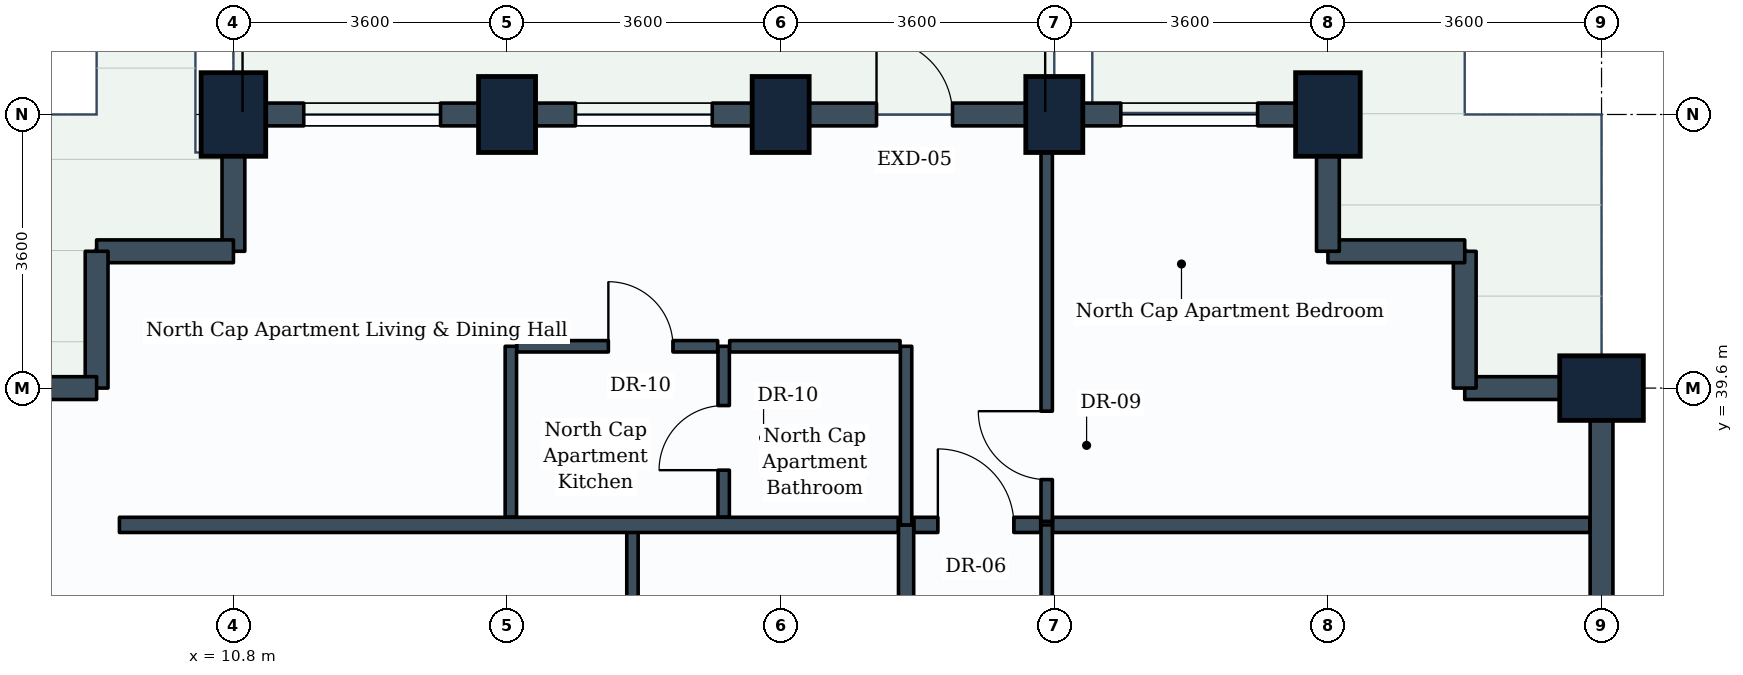
"""IFC4 building model, lengths in metres.
Left out: names, types, materials, properties, quantities, classifications, styles, units other than length and angle.
Written with IfcOpenShell. Run it as: python <this file> out.ifc"""

import sys

from ifc_helpers import new_model, si_unit, direction, frame, frame_2d, origin, origin_2d, place, context, subcontext, project, spatial, rectangle, extrude, element, fill, save


model = new_model("IFC4")
c1 = context("Model", 3, precision=1e-05, world=origin(), true_north=direction((0.0, 1.0)))
c2 = subcontext(c1, "Body", "Model", "MODEL_VIEW")
j1 = project(units=[si_unit("LENGTHUNIT", "METRE"), si_unit("PLANEANGLEUNIT", "RADIAN")], contexts=[c1])
p1 = place(None, origin())
s1 = spatial("IfcSite", under=j1, at=p1, CompositionType="ELEMENT")
p2 = place(p1, origin())
s2 = spatial("IfcBuilding", under=s1, at=p2, CompositionType="ELEMENT")
p3 = place(p2, frame((0.0, 0.0, 127.6)))
s3 = spatial("IfcBuildingStorey", under=s2, at=p3, CompositionType="ELEMENT", Elevation=127.6)
p4 = place(p3, frame((10.8, 43.2, 0.0), z_axis=(0.0, 0.0, 1.0), x_axis=(1.0, 0.0, 0.0)))
e1 = element("IfcColumn", 1, at=p4, inside=s3, PredefinedType="COLUMN", context=c2, shape_type="SweptSolid", body=[
    extrude(rectangle(XDim=0.85, YDim=1.1, at=origin_2d()), origin(), (0.0, 0.0, 1.0), 3.8),
])
for number, where, z_axis, x_axis in (
    (2, (14.4, 43.2, 0.0), (0.0, 0.0, 1.0), (1.0, 0.0, 0.0)),
    (3, (18.0, 43.2, 0.0), (0.0, 0.0, 1.0), (1.0, 0.0, 0.0)),
    (4, (21.6, 43.2, 0.0), (0.0, 0.0, 1.0), (1.0, 0.0, 0.0)),
):
    element("IfcColumn", number, at=place(p3, frame(where, z_axis=z_axis, x_axis=x_axis)), inside=s3, PredefinedType="COLUMN", context=c2, shape_type="SweptSolid", body=[
        extrude(rectangle(XDim=0.75, YDim=1.0, at=origin_2d()), origin(), (0.0, 0.0, 1.0), 3.8),
    ])
for number, where, z_axis, x_axis in (
    (5, (25.2, 43.2, 0.0), (0.0, 0.0, 1.0), (1.0, 0.0, 0.0)),
    (6, (28.8, 39.6, 0.0), (0.0, 0.0, 1.0), (0.0, 1.0, 0.0)),
):
    element("IfcColumn", number, at=place(p3, frame(where, z_axis=z_axis, x_axis=x_axis)), inside=s3, PredefinedType="COLUMN", context=c2, shape_type="SweptSolid", body=[
        extrude(rectangle(XDim=0.85, YDim=1.1, at=origin_2d()), origin(), (0.0, 0.0, 1.0), 3.8),
    ])
p5 = place(p3, frame((28.8, 39.6, 0.0), z_axis=(0.0, 0.0, 1.0), x_axis=(0.0, -1.0, 0.0)))
e7 = element("IfcWall", 7, at=p5, inside=s3, PredefinedType="STANDARD", context=c2, shape_type="SweptSolid", body=[
    extrude(rectangle(XDim=3.6, YDim=0.3, at=frame_2d((1.8, 0.0))), origin(), (0.0, 0.0, 1.0), 2.93),
])
p6 = place(p3, frame((27.0, 39.6, 0.0), z_axis=(0.0, 0.0, 1.0), x_axis=(1.0, 0.0, 0.0)))
e8 = element("IfcWall", 8, at=p6, inside=s3, PredefinedType="STANDARD", context=c2, shape_type="SweptSolid", body=[
    extrude(rectangle(XDim=1.8, YDim=0.3, at=frame_2d((0.9, 0.0))), origin(), (0.0, 0.0, 1.0), 2.93),
])
p7 = place(p3, frame((27.0, 39.6, 0.0), z_axis=(0.0, 0.0, 1.0), x_axis=(0.0, 1.0, 0.0)))
e9 = element("IfcWall", 9, at=p7, inside=s3, PredefinedType="STANDARD", context=c2, shape_type="SweptSolid", body=[
    extrude(rectangle(XDim=1.8, YDim=0.3, at=frame_2d((0.9, 0.0))), origin(), (0.0, 0.0, 1.0), 3.535),
])
p8 = place(p3, frame((25.2, 41.4, 0.0), z_axis=(0.0, 0.0, 1.0), x_axis=(1.0, 0.0, 0.0)))
e10 = element("IfcWall", 10, at=p8, inside=s3, PredefinedType="STANDARD", context=c2, shape_type="SweptSolid", body=[
    extrude(rectangle(XDim=1.8, YDim=0.3, at=frame_2d((0.9, 0.0))), origin(), (0.0, 0.0, 1.0), 3.535),
])
p9 = place(p3, frame((25.2, 41.4, 0.0), z_axis=(0.0, 0.0, 1.0), x_axis=(0.0, 1.0, 0.0)))
e11 = element("IfcWall", 11, at=p9, inside=s3, PredefinedType="STANDARD", context=c2, shape_type="SweptSolid", body=[
    extrude(rectangle(XDim=1.8, YDim=0.3, at=frame_2d((0.9, 0.0))), origin(), (0.0, 0.0, 1.0), 2.93),
])
p10 = place(p3, frame((21.6, 43.2, 0.0), z_axis=(0.0, 0.0, 1.0), x_axis=(1.0, 0.0, 0.0)))
e12 = element("IfcWall", 12, at=p10, inside=s3, PredefinedType="STANDARD", context=c2, shape_type="SweptSolid", body=[
    extrude(rectangle(XDim=3.6, YDim=0.3, at=frame_2d((1.8, 0.0))), origin(), (0.0, 0.0, 1.0), 2.93),
])
p11 = place(p10, frame((0.875, 0.0, 0.85)))
e13 = element("IfcOpeningElement", 13, at=p11, cuts=e12, PredefinedType="OPENING", context=c2, shape_type="SweptSolid", body=[
    extrude(rectangle(XDim=1.8, YDim=1.35, at=frame_2d((0.9, 0.675))), frame((0.0, 0.16, 0.0), z_axis=(0.0, -1.0, 0.0), x_axis=(1.0, 0.0, 0.0)), (0.0, 0.0, 1.0), 0.32),
])
p12 = place(p3, frame((18.0, 43.2, 0.0), z_axis=(0.0, 0.0, 1.0), x_axis=(1.0, 0.0, 0.0)))
e14 = element("IfcWall", 14, at=p12, inside=s3, PredefinedType="STANDARD", context=c2, shape_type="SweptSolid", body=[
    extrude(rectangle(XDim=3.6, YDim=0.3, at=frame_2d((1.8, 0.0))), origin(), (0.0, 0.0, 1.0), 2.93),
])
p13 = place(p12, frame((1.261, 0.0, 0.0)))
e15 = element("IfcOpeningElement", 15, at=p13, cuts=e14, PredefinedType="OPENING", context=c2, shape_type="SweptSolid", body=[
    extrude(rectangle(XDim=1.0, YDim=2.1, at=frame_2d((0.5, 1.05))), frame((0.0, 0.16, 0.0), z_axis=(0.0, -1.0, 0.0), x_axis=(1.0, 0.0, 0.0)), (0.0, 0.0, 1.0), 0.32),
])
p14 = place(p3, frame((14.4, 43.2, 0.0), z_axis=(0.0, 0.0, 1.0), x_axis=(1.0, 0.0, 0.0)))
e16 = element("IfcWall", 16, at=p14, inside=s3, PredefinedType="STANDARD", context=c2, shape_type="SweptSolid", body=[
    extrude(rectangle(XDim=3.6, YDim=0.3, at=frame_2d((1.8, 0.0))), origin(), (0.0, 0.0, 1.0), 2.93),
])
p15 = place(p14, frame((0.9, 0.0, 0.85)))
e17 = element("IfcOpeningElement", 17, at=p15, cuts=e16, PredefinedType="OPENING", context=c2, shape_type="SweptSolid", body=[
    extrude(rectangle(XDim=1.8, YDim=1.35, at=frame_2d((0.9, 0.675))), frame((0.0, 0.16, 0.0), z_axis=(0.0, -1.0, 0.0), x_axis=(1.0, 0.0, 0.0)), (0.0, 0.0, 1.0), 0.32),
])
p16 = place(p3, frame((10.8, 43.2, 0.0), z_axis=(0.0, 0.0, 1.0), x_axis=(1.0, 0.0, 0.0)))
e18 = element("IfcWall", 18, at=p16, inside=s3, PredefinedType="STANDARD", context=c2, shape_type="SweptSolid", body=[
    extrude(rectangle(XDim=3.6, YDim=0.3, at=frame_2d((1.8, 0.0))), origin(), (0.0, 0.0, 1.0), 2.93),
])
p17 = place(p16, frame((0.925, 0.0, 0.85)))
e19 = element("IfcOpeningElement", 19, at=p17, cuts=e18, PredefinedType="OPENING", context=c2, shape_type="SweptSolid", body=[
    extrude(rectangle(XDim=1.8, YDim=1.35, at=frame_2d((0.9, 0.675))), frame((0.0, 0.16, 0.0), z_axis=(0.0, -1.0, 0.0), x_axis=(1.0, 0.0, 0.0)), (0.0, 0.0, 1.0), 0.32),
])
p18 = place(p3, frame((10.8, 41.4, 0.0), z_axis=(0.0, 0.0, 1.0), x_axis=(0.0, 1.0, 0.0)))
e20 = element("IfcWall", 20, at=p18, inside=s3, PredefinedType="STANDARD", context=c2, shape_type="SweptSolid", body=[
    extrude(rectangle(XDim=1.8, YDim=0.3, at=frame_2d((0.9, 0.0))), origin(), (0.0, 0.0, 1.0), 2.93),
])
p19 = place(p3, frame((9.0, 41.4, 0.0), z_axis=(0.0, 0.0, 1.0), x_axis=(1.0, 0.0, 0.0)))
e21 = element("IfcWall", 21, at=p19, inside=s3, PredefinedType="STANDARD", context=c2, shape_type="SweptSolid", body=[
    extrude(rectangle(XDim=1.8, YDim=0.3, at=frame_2d((0.9, 0.0))), origin(), (0.0, 0.0, 1.0), 3.535),
])
p20 = place(p3, frame((9.0, 39.6, 0.0), z_axis=(0.0, 0.0, 1.0), x_axis=(0.0, 1.0, 0.0)))
e22 = element("IfcWall", 22, at=p20, inside=s3, PredefinedType="STANDARD", context=c2, shape_type="SweptSolid", body=[
    extrude(rectangle(XDim=1.8, YDim=0.3, at=frame_2d((0.9, 0.0))), origin(), (0.0, 0.0, 1.0), 3.535),
])
p21 = place(p3, frame((7.2, 39.6, 0.0), z_axis=(0.0, 0.0, 1.0), x_axis=(1.0, 0.0, 0.0)))
e23 = element("IfcWall", 23, at=p21, inside=s3, PredefinedType="STANDARD", context=c2, shape_type="SweptSolid", body=[
    extrude(rectangle(XDim=1.8, YDim=0.3, at=frame_2d((0.9, 0.0))), origin(), (0.0, 0.0, 1.0), 2.93),
])
p22 = place(p3, frame((19.65, 33.7, 0.0), z_axis=(0.0, 0.0, 1.0), x_axis=(0.0, 1.0, 0.0)))
e24 = element("IfcWall", 24, at=p22, inside=s3, PredefinedType="PARTITIONING", context=c2, shape_type="SweptSolid", body=[
    extrude(rectangle(XDim=4.1, YDim=0.2, at=frame_2d((2.05, 0.0))), origin(), (0.0, 0.0, 1.0), 3.17),
])
p23 = place(p22, frame((1.55, 0.0, 0.0)))
e25 = element("IfcOpeningElement", 25, at=p23, cuts=e24, PredefinedType="OPENING", context=c2, shape_type="SweptSolid", body=[
    extrude(rectangle(XDim=1.0, YDim=2.1, at=frame_2d((0.5, 1.05))), frame((0.0, 0.11, 0.0), z_axis=(0.0, -1.0, 0.0), x_axis=(1.0, 0.0, 0.0)), (0.0, 0.0, 1.0), 0.22),
])
p24 = place(p3, frame((16.05, 33.9, 0.0), z_axis=(0.0, 0.0, 1.0), x_axis=(0.0, 1.0, 0.0)))
e26 = element("IfcWall", 26, at=p24, inside=s3, PredefinedType="PARTITIONING", context=c2, shape_type="SweptSolid", body=[
    extrude(rectangle(XDim=3.9, YDim=0.15, at=frame_2d((1.95, 0.0))), origin(), (0.0, 0.0, 1.0), 3.17),
])
p25 = place(p24, frame((1.461, 0.0, 0.0)))
e27 = element("IfcOpeningElement", 27, at=p25, cuts=e26, PredefinedType="OPENING", context=c2, shape_type="SweptSolid", body=[
    extrude(rectangle(XDim=0.9, YDim=2.1, at=frame_2d((0.45, 1.05))), frame((0.0, 0.085, 0.0), z_axis=(0.0, -1.0, 0.0), x_axis=(1.0, 0.0, 0.0)), (0.0, 0.0, 1.0), 0.17),
])
p26 = place(p3, frame((21.5, 26.879, 0.0), z_axis=(0.0, 0.0, 1.0), x_axis=(0.0, 1.0, 0.0)))
e28 = element("IfcWall", 28, at=p26, inside=s3, PredefinedType="PARTITIONING", context=c2, shape_type="SweptSolid", body=[
    extrude(rectangle(XDim=10.921, YDim=0.15, at=frame_2d((5.46, 0.0))), origin(), (0.0, 0.0, 1.0), 3.13),
])
p27 = place(p26, frame((4.247, 0.0, 0.0)))
e29 = element("IfcOpeningElement", 29, at=p27, cuts=e28, PredefinedType="OPENING", context=c2, shape_type="SweptSolid", body=[
    extrude(rectangle(XDim=1.0, YDim=2.1, at=frame_2d((0.5, 1.05))), frame((0.0, 0.085, 0.0), z_axis=(0.0, -1.0, 0.0), x_axis=(1.0, 0.0, 0.0)), (0.0, 0.0, 1.0), 0.17),
])
p28 = place(p3, frame((9.3, 37.8, 0.0), z_axis=(0.0, 0.0, 1.0), x_axis=(1.0, 0.0, 0.0)))
e30 = element("IfcWall", 30, at=p28, inside=s3, PredefinedType="PARTITIONING", context=c2, shape_type="SweptSolid", body=[
    extrude(rectangle(XDim=10.246, YDim=0.2, at=frame_2d((5.123, 0.0))), origin(), (0.0, 0.0, 1.0), 3.17),
])
p29 = place(p3, frame((21.579, 37.8, 0.0), z_axis=(0.0, 0.0, 1.0), x_axis=(1.0, 0.0, 0.0)))
e31 = element("IfcWall", 31, at=p29, inside=s3, PredefinedType="PARTITIONING", context=c2, shape_type="SweptSolid", body=[
    extrude(rectangle(XDim=7.067, YDim=0.2, at=frame_2d((3.533, 0.0))), origin(), (0.0, 0.0, 1.0), 2.93),
])
p30 = place(p3, frame((19.754, 37.8, 0.0), z_axis=(0.0, 0.0, 1.0), x_axis=(1.0, 0.0, 0.0)))
e32 = element("IfcWall", 32, at=p30, inside=s3, PredefinedType="PARTITIONING", context=c2, shape_type="SweptSolid", body=[
    extrude(rectangle(XDim=1.667, YDim=0.2, at=frame_2d((0.833, 0.0))), origin(), (0.0, 0.0, 1.0), 3.535),
])
p31 = place(p30, frame((0.314, 0.0, 0.0)))
e33 = element("IfcOpeningElement", 33, at=p31, cuts=e32, PredefinedType="OPENING", context=c2, shape_type="SweptSolid", body=[
    extrude(rectangle(XDim=1.0, YDim=2.1, at=frame_2d((0.5, 1.05))), frame((0.0, 0.11, 0.0), z_axis=(0.0, -1.0, 0.0), x_axis=(1.0, 0.0, 0.0)), (0.0, 0.0, 1.0), 0.22),
])
p32 = place(p3, frame((19.65, 37.8, 0.0), z_axis=(0.0, 0.0, 1.0), x_axis=(0.0, 1.0, 0.0)))
e34 = element("IfcWall", 34, at=p32, inside=s3, PredefinedType="PARTITIONING", context=c2, shape_type="SweptSolid", body=[
    extrude(rectangle(XDim=2.35, YDim=0.15, at=frame_2d((1.175, 0.0))), origin(), (0.0, 0.0, 1.0), 3.535),
])
p33 = place(p3, frame((17.25, 37.904, 0.0), z_axis=(0.0, 0.0, 1.0), x_axis=(0.0, 1.0, 0.0)))
e35 = element("IfcWall", 35, at=p33, inside=s3, PredefinedType="PARTITIONING", context=c2, shape_type="SweptSolid", body=[
    extrude(rectangle(XDim=2.246, YDim=0.15, at=frame_2d((1.123, 0.0))), origin(), (0.0, 0.0, 1.0), 3.535),
])
p34 = place(p33, frame((0.616, 0.0, 0.0)))
e36 = element("IfcOpeningElement", 36, at=p34, cuts=e35, PredefinedType="OPENING", context=c2, shape_type="SweptSolid", body=[
    extrude(rectangle(XDim=0.85, YDim=2.1, at=frame_2d((0.425, 1.05))), frame((0.0, 0.085, 0.0), z_axis=(0.0, -1.0, 0.0), x_axis=(1.0, 0.0, 0.0)), (0.0, 0.0, 1.0), 0.17),
])
p35 = place(p3, frame((17.329, 40.15, 0.0), z_axis=(0.0, 0.0, 1.0), x_axis=(1.0, 0.0, 0.0)))
e37 = element("IfcWall", 37, at=p35, inside=s3, PredefinedType="PARTITIONING", context=c2, shape_type="SweptSolid", body=[
    extrude(rectangle(XDim=2.242, YDim=0.15, at=frame_2d((1.121, 0.0))), origin(), (0.0, 0.0, 1.0), 3.17),
])
p36 = place(p3, frame((21.5, 37.846, 0.0), z_axis=(0.0, 0.0, 1.0), x_axis=(0.0, 1.0, 0.0)))
e38 = element("IfcWall", 38, at=p36, inside=s3, PredefinedType="PARTITIONING", context=c2, shape_type="SweptSolid", body=[
    extrude(rectangle(XDim=5.2, YDim=0.15, at=frame_2d((2.6, 0.0))), origin(), (0.0, 0.0, 1.0), 2.93),
])
p37 = place(p36, frame((0.55, 0.0, 0.0)))
e39 = element("IfcOpeningElement", 39, at=p37, cuts=e38, PredefinedType="OPENING", context=c2, shape_type="SweptSolid", body=[
    extrude(rectangle(XDim=0.9, YDim=2.1, at=frame_2d((0.45, 1.05))), frame((0.0, 0.085, 0.0), z_axis=(0.0, -1.0, 0.0), x_axis=(1.0, 0.0, 0.0)), (0.0, 0.0, 1.0), 0.17),
])
p38 = place(p3, frame((14.45, 37.904, 0.0), z_axis=(0.0, 0.0, 1.0), x_axis=(0.0, 1.0, 0.0)))
e40 = element("IfcWall", 40, at=p38, inside=s3, PredefinedType="PARTITIONING", context=c2, shape_type="SweptSolid", body=[
    extrude(rectangle(XDim=2.246, YDim=0.15, at=frame_2d((1.123, 0.0))), origin(), (0.0, 0.0, 1.0), 3.535),
])
p39 = place(p3, frame((14.529, 40.15, 0.0), z_axis=(0.0, 0.0, 1.0), x_axis=(1.0, 0.0, 0.0)))
e41 = element("IfcWall", 41, at=p39, inside=s3, PredefinedType="PARTITIONING", context=c2, shape_type="SweptSolid", body=[
    extrude(rectangle(XDim=2.642, YDim=0.15, at=frame_2d((1.321, 0.0))), origin(), (0.0, 0.0, 1.0), 3.535),
])
p40 = place(p39, frame((1.204, 0.0, 0.0)))
e42 = element("IfcOpeningElement", 42, at=p40, cuts=e41, PredefinedType="OPENING", context=c2, shape_type="SweptSolid", body=[
    extrude(rectangle(XDim=0.85, YDim=2.1, at=frame_2d((0.425, 1.05))), frame((0.0, 0.085, 0.0), z_axis=(0.0, -1.0, 0.0), x_axis=(1.0, 0.0, 0.0)), (0.0, 0.0, 1.0), 0.17),
])
p41 = place(p11, origin())
e43 = element("IfcWindow", 43, at=p41, inside=s3, PartitioningType="SINGLE_PANEL", PredefinedType="WINDOW", context=c2, shape_type="SweptSolid", body=[
    extrude(rectangle(XDim=1.8, YDim=1.35, at=frame_2d((0.9, 0.675))), frame((0.0, 0.03, 0.0), z_axis=(0.0, -1.0, 0.0), x_axis=(1.0, 0.0, 0.0)), (0.0, 0.0, 1.0), 0.06),
])
fill(e13, e43)
p42 = place(p13, origin())
e44 = element("IfcDoor", 44, at=p42, inside=s3, OperationType="SINGLE_SWING_LEFT", PredefinedType="DOOR", context=c2, shape_type="SweptSolid", body=[
    extrude(rectangle(XDim=1.0, YDim=2.1, at=frame_2d((0.5, 1.05))), frame((0.0, 0.025, 0.0), z_axis=(0.0, -1.0, 0.0), x_axis=(1.0, 0.0, 0.0)), (0.0, 0.0, 1.0), 0.05),
])
fill(e15, e44)
p43 = place(p15, origin())
e45 = element("IfcWindow", 45, at=p43, inside=s3, PartitioningType="SINGLE_PANEL", PredefinedType="WINDOW", context=c2, shape_type="SweptSolid", body=[
    extrude(rectangle(XDim=1.8, YDim=1.35, at=frame_2d((0.9, 0.675))), frame((0.0, 0.03, 0.0), z_axis=(0.0, -1.0, 0.0), x_axis=(1.0, 0.0, 0.0)), (0.0, 0.0, 1.0), 0.06),
])
fill(e17, e45)
p44 = place(p17, origin())
e46 = element("IfcWindow", 46, at=p44, inside=s3, PartitioningType="SINGLE_PANEL", PredefinedType="WINDOW", context=c2, shape_type="SweptSolid", body=[
    extrude(rectangle(XDim=1.8, YDim=1.35, at=frame_2d((0.9, 0.675))), frame((0.0, 0.03, 0.0), z_axis=(0.0, -1.0, 0.0), x_axis=(1.0, 0.0, 0.0)), (0.0, 0.0, 1.0), 0.06),
])
fill(e19, e46)
p45 = place(p31, origin())
e47 = element("IfcDoor", 47, at=p45, inside=s3, OperationType="SINGLE_SWING_LEFT", PredefinedType="DOOR", context=c2, shape_type="SweptSolid", body=[
    extrude(rectangle(XDim=1.0, YDim=2.1, at=frame_2d((0.5, 1.05))), frame((0.0, 0.025, 0.0), z_axis=(0.0, -1.0, 0.0), x_axis=(1.0, 0.0, 0.0)), (0.0, 0.0, 1.0), 0.05),
])
fill(e33, e47)
p46 = place(p34, origin())
e48 = element("IfcDoor", 48, at=p46, inside=s3, OperationType="SINGLE_SWING_LEFT", PredefinedType="DOOR", context=c2, shape_type="SweptSolid", body=[
    extrude(rectangle(XDim=0.85, YDim=2.1, at=frame_2d((0.425, 1.05))), frame((0.0, 0.025, 0.0), z_axis=(0.0, -1.0, 0.0), x_axis=(1.0, 0.0, 0.0)), (0.0, 0.0, 1.0), 0.05),
])
fill(e36, e48)
p47 = place(p37, origin())
e49 = element("IfcDoor", 49, at=p47, inside=s3, OperationType="SINGLE_SWING_RIGHT", PredefinedType="DOOR", context=c2, shape_type="SweptSolid", body=[
    extrude(rectangle(XDim=0.9, YDim=2.1, at=frame_2d((0.45, 1.05))), frame((0.0, 0.025, 0.0), z_axis=(0.0, -1.0, 0.0), x_axis=(1.0, 0.0, 0.0)), (0.0, 0.0, 1.0), 0.05),
])
fill(e39, e49)
p48 = place(p40, origin())
e50 = element("IfcDoor", 50, at=p48, inside=s3, OperationType="SINGLE_SWING_LEFT", PredefinedType="DOOR", context=c2, shape_type="SweptSolid", body=[
    extrude(rectangle(XDim=0.85, YDim=2.1, at=frame_2d((0.425, 1.05))), frame((0.0, 0.025, 0.0), z_axis=(0.0, -1.0, 0.0), x_axis=(1.0, 0.0, 0.0)), (0.0, 0.0, 1.0), 0.05),
])
fill(e42, e50)
save(model, sys.argv[1])
